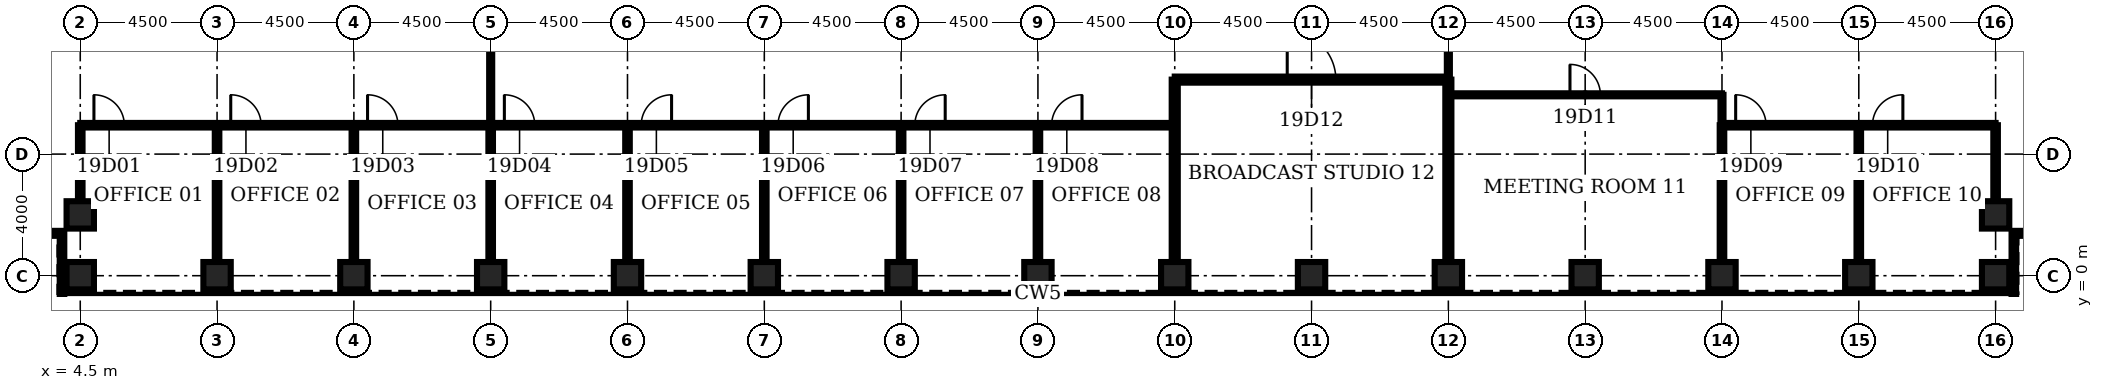
"""IFC4 building model, lengths in metres.
Left out: names, types, materials, properties, quantities, classifications, styles, units other than length and angle.
Written with IfcOpenShell. Run it as: python <this file> out.ifc"""

import sys

from ifc_helpers import new_model, si_unit, direction, frame, frame_2d, origin, origin_2d, place, context, subcontext, project, spatial, rectangle, hollow_rectangle, extrude, element, fill, save


model = new_model("IFC4")
c1 = context("Model", 3, precision=1e-05, world=origin(), true_north=direction((0.0, 1.0)))
c2 = subcontext(c1, "Body", "Model", "MODEL_VIEW")
j1 = project(units=[si_unit("LENGTHUNIT", "METRE"), si_unit("PLANEANGLEUNIT", "RADIAN")], contexts=[c1])
p1 = place(None, origin())
s1 = spatial("IfcSite", under=j1, at=p1, CompositionType="ELEMENT")
p2 = place(p1, origin())
s2 = spatial("IfcBuilding", under=s1, at=p2, CompositionType="ELEMENT")
p3 = place(p2, frame((0.0, 0.0, 90.5)))
s3 = spatial("IfcBuildingStorey", under=s2, at=p3, CompositionType="ELEMENT", Elevation=90.5)
for number, where, z_axis, x_axis in (
    (1, (4.5, 0.0, 0.0), (0.0, 0.0, 1.0), (0.0, 1.0, 0.0)),
    (2, (9.0, 0.0, 0.0), (0.0, 0.0, 1.0), (0.0, 1.0, 0.0)),
    (3, (13.5, 0.0, 0.0), (0.0, 0.0, 1.0), (0.0, 1.0, 0.0)),
    (4, (18.0, 0.0, 0.0), (0.0, 0.0, 1.0), (0.0, 1.0, 0.0)),
    (5, (22.5, 0.0, 0.0), (0.0, 0.0, 1.0), (0.0, 1.0, 0.0)),
    (6, (27.0, 0.0, 0.0), (0.0, 0.0, 1.0), (0.0, 1.0, 0.0)),
    (7, (31.5, 0.0, 0.0), (0.0, 0.0, 1.0), (0.0, 1.0, 0.0)),
    (8, (36.0, 0.0, 0.0), (0.0, 0.0, 1.0), (0.0, 1.0, 0.0)),
    (9, (40.5, 0.0, 0.0), (0.0, 0.0, 1.0), (0.0, 1.0, 0.0)),
    (10, (45.0, 0.0, 0.0), (0.0, 0.0, 1.0), (0.0, 1.0, 0.0)),
    (11, (49.5, 0.0, 0.0), (0.0, 0.0, 1.0), (0.0, 1.0, 0.0)),
    (12, (54.0, 0.0, 0.0), (0.0, 0.0, 1.0), (0.0, 1.0, 0.0)),
    (13, (58.5, 0.0, 0.0), (0.0, 0.0, 1.0), (0.0, 1.0, 0.0)),
    (14, (63.0, 0.0, 0.0), (0.0, 0.0, 1.0), (0.0, 1.0, 0.0)),
    (15, (67.5, 0.0, 0.0), (0.0, 0.0, 1.0), (0.0, 1.0, 0.0)),
    (16, (67.5, 2.0, 0.0), (0.0, 0.0, 1.0), (0.0, 1.0, 0.0)),
    (17, (4.5, 2.0, 0.0), (0.0, 0.0, 1.0), (0.0, 1.0, 0.0)),
):
    element("IfcColumn", number, at=place(p3, frame(where, z_axis=z_axis, x_axis=x_axis)), inside=s3, PredefinedType="COLUMN", context=c2, shape_type="SweptSolid", body=[
        extrude(hollow_rectangle(XDim=0.9, YDim=0.9, WallThickness=0.11, at=origin_2d()), origin(), (0.0, 0.0, 1.0), 4.5),
    ])
p4 = place(p3, frame((4.5, 4.95, 0.0), z_axis=(0.0, 0.0, 1.0), x_axis=(1.0, 0.0, 0.0)))
e18 = element("IfcWall", 18, at=p4, inside=s3, PredefinedType="PARTITIONING", context=c2, shape_type="SweptSolid", body=[
    extrude(rectangle(XDim=36.0, YDim=0.15, at=frame_2d((18.0, 0.0))), origin(), (0.0, 0.0, 1.0), 3.0),
])
p5 = place(p4, frame((0.45, 0.0, 0.0)))
e19 = element("IfcOpeningElement", 19, at=p5, cuts=e18, PredefinedType="OPENING", context=c2, shape_type="SweptSolid", body=[
    extrude(rectangle(XDim=1.0, YDim=2.1, at=frame_2d((0.5, 1.05))), frame((0.0, 0.085, 0.0), z_axis=(0.0, -1.0, 0.0), x_axis=(1.0, 0.0, 0.0)), (0.0, 0.0, 1.0), 0.17),
])
p6 = place(p4, frame((4.95, 0.0, 0.0)))
e20 = element("IfcOpeningElement", 20, at=p6, cuts=e18, PredefinedType="OPENING", context=c2, shape_type="SweptSolid", body=[
    extrude(rectangle(XDim=1.0, YDim=2.1, at=frame_2d((0.5, 1.05))), frame((0.0, 0.085, 0.0), z_axis=(0.0, -1.0, 0.0), x_axis=(1.0, 0.0, 0.0)), (0.0, 0.0, 1.0), 0.17),
])
p7 = place(p4, frame((9.45, 0.0, 0.0)))
e21 = element("IfcOpeningElement", 21, at=p7, cuts=e18, PredefinedType="OPENING", context=c2, shape_type="SweptSolid", body=[
    extrude(rectangle(XDim=1.0, YDim=2.1, at=frame_2d((0.5, 1.05))), frame((0.0, 0.085, 0.0), z_axis=(0.0, -1.0, 0.0), x_axis=(1.0, 0.0, 0.0)), (0.0, 0.0, 1.0), 0.17),
])
p8 = place(p4, frame((13.95, 0.0, 0.0)))
e22 = element("IfcOpeningElement", 22, at=p8, cuts=e18, PredefinedType="OPENING", context=c2, shape_type="SweptSolid", body=[
    extrude(rectangle(XDim=1.0, YDim=2.1, at=frame_2d((0.5, 1.05))), frame((0.0, 0.085, 0.0), z_axis=(0.0, -1.0, 0.0), x_axis=(1.0, 0.0, 0.0)), (0.0, 0.0, 1.0), 0.17),
])
p9 = place(p4, frame((18.45, 0.0, 0.0)))
e23 = element("IfcOpeningElement", 23, at=p9, cuts=e18, PredefinedType="OPENING", context=c2, shape_type="SweptSolid", body=[
    extrude(rectangle(XDim=1.0, YDim=2.1, at=frame_2d((0.5, 1.05))), frame((0.0, 0.085, 0.0), z_axis=(0.0, -1.0, 0.0), x_axis=(1.0, 0.0, 0.0)), (0.0, 0.0, 1.0), 0.17),
])
p10 = place(p4, frame((22.95, 0.0, 0.0)))
e24 = element("IfcOpeningElement", 24, at=p10, cuts=e18, PredefinedType="OPENING", context=c2, shape_type="SweptSolid", body=[
    extrude(rectangle(XDim=1.0, YDim=2.1, at=frame_2d((0.5, 1.05))), frame((0.0, 0.085, 0.0), z_axis=(0.0, -1.0, 0.0), x_axis=(1.0, 0.0, 0.0)), (0.0, 0.0, 1.0), 0.17),
])
p11 = place(p4, frame((27.45, 0.0, 0.0)))
e25 = element("IfcOpeningElement", 25, at=p11, cuts=e18, PredefinedType="OPENING", context=c2, shape_type="SweptSolid", body=[
    extrude(rectangle(XDim=1.0, YDim=2.1, at=frame_2d((0.5, 1.05))), frame((0.0, 0.085, 0.0), z_axis=(0.0, -1.0, 0.0), x_axis=(1.0, 0.0, 0.0)), (0.0, 0.0, 1.0), 0.17),
])
p12 = place(p4, frame((31.95, 0.0, 0.0)))
e26 = element("IfcOpeningElement", 26, at=p12, cuts=e18, PredefinedType="OPENING", context=c2, shape_type="SweptSolid", body=[
    extrude(rectangle(XDim=1.0, YDim=2.1, at=frame_2d((0.5, 1.05))), frame((0.0, 0.085, 0.0), z_axis=(0.0, -1.0, 0.0), x_axis=(1.0, 0.0, 0.0)), (0.0, 0.0, 1.0), 0.17),
])
p13 = place(p3, frame((58.5, 4.95, 0.0), z_axis=(0.0, 0.0, 1.0), x_axis=(1.0, 0.0, 0.0)))
e27 = element("IfcWall", 27, at=p13, inside=s3, PredefinedType="PARTITIONING", context=c2, shape_type="SweptSolid", body=[
    extrude(rectangle(XDim=9.0, YDim=0.15, at=frame_2d((4.5, 0.0))), origin(), (0.0, 0.0, 1.0), 3.0),
])
p14 = place(p13, frame((0.45, 0.0, 0.0)))
e28 = element("IfcOpeningElement", 28, at=p14, cuts=e27, PredefinedType="OPENING", context=c2, shape_type="SweptSolid", body=[
    extrude(rectangle(XDim=1.0, YDim=2.1, at=frame_2d((0.5, 1.05))), frame((0.0, 0.085, 0.0), z_axis=(0.0, -1.0, 0.0), x_axis=(1.0, 0.0, 0.0)), (0.0, 0.0, 1.0), 0.17),
])
p15 = place(p13, frame((4.95, 0.0, 0.0)))
e29 = element("IfcOpeningElement", 29, at=p15, cuts=e27, PredefinedType="OPENING", context=c2, shape_type="SweptSolid", body=[
    extrude(rectangle(XDim=1.0, YDim=2.1, at=frame_2d((0.5, 1.05))), frame((0.0, 0.085, 0.0), z_axis=(0.0, -1.0, 0.0), x_axis=(1.0, 0.0, 0.0)), (0.0, 0.0, 1.0), 0.17),
])
p16 = place(p3, frame((49.5, 5.95, 0.0), z_axis=(0.0, 0.0, 1.0), x_axis=(1.0, 0.0, 0.0)))
e30 = element("IfcWall", 30, at=p16, inside=s3, PredefinedType="PARTITIONING", context=c2, shape_type="SweptSolid", body=[
    extrude(rectangle(XDim=9.0, YDim=0.1, at=frame_2d((4.5, 0.0))), origin(), (0.0, 0.0, 1.0), 3.0),
])
p17 = place(p16, frame((4.0, 0.0, 0.0)))
e31 = element("IfcOpeningElement", 31, at=p17, cuts=e30, PredefinedType="OPENING", context=c2, shape_type="SweptSolid", body=[
    extrude(rectangle(XDim=1.0, YDim=2.1, at=frame_2d((0.5, 1.05))), frame((0.0, 0.06, 0.0), z_axis=(0.0, -1.0, 0.0), x_axis=(1.0, 0.0, 0.0)), (0.0, 0.0, 1.0), 0.12),
])
p18 = place(p3, frame((40.5, 6.45, 0.0), z_axis=(0.0, 0.0, 1.0), x_axis=(1.0, 0.0, 0.0)))
e32 = element("IfcWall", 32, at=p18, inside=s3, PredefinedType="PARTITIONING", context=c2, shape_type="SweptSolid", body=[
    extrude(rectangle(XDim=9.0, YDim=0.2, at=frame_2d((4.5, 0.0))), origin(), (0.0, 0.0, 1.0), 3.0),
])
p19 = place(p18, frame((3.7, 0.0, 0.0)))
e33 = element("IfcOpeningElement", 33, at=p19, cuts=e32, PredefinedType="OPENING", context=c2, shape_type="SweptSolid", body=[
    extrude(rectangle(XDim=1.6, YDim=2.1, at=frame_2d((0.8, 1.05))), frame((0.0, 0.11, 0.0), z_axis=(0.0, -1.0, 0.0), x_axis=(1.0, 0.0, 0.0)), (0.0, 0.0, 1.0), 0.22),
])
p20 = place(p3, frame((4.5, 2.45, 0.0), z_axis=(0.0, 0.0, 1.0), x_axis=(0.0, 1.0, 0.0)))
e34 = element("IfcWall", 34, at=p20, inside=s3, PredefinedType="PARTITIONING", context=c2, shape_type="SweptSolid", body=[
    extrude(rectangle(XDim=2.5, YDim=0.15, at=frame_2d((1.25, 0.0))), origin(), (0.0, 0.0, 1.0), 3.0),
])
for number, where, z_axis, x_axis in (
    (35, (9.0, 0.45, 0.0), (0.0, 0.0, 1.0), (0.0, 1.0, 0.0)),
    (36, (13.5, 0.45, 0.0), (0.0, 0.0, 1.0), (0.0, 1.0, 0.0)),
    (37, (18.0, 0.45, 0.0), (0.0, 0.0, 1.0), (0.0, 1.0, 0.0)),
):
    element("IfcWall", number, at=place(p3, frame(where, z_axis=z_axis, x_axis=x_axis)), inside=s3, PredefinedType="PARTITIONING", context=c2, shape_type="SweptSolid", body=[
        extrude(rectangle(XDim=4.5, YDim=0.15, at=frame_2d((2.25, 0.0))), origin(), (0.0, 0.0, 1.0), 3.0),
    ])
p21 = place(p3, frame((18.0, 4.95, 0.0), z_axis=(0.0, 0.0, 1.0), x_axis=(0.0, 1.0, 0.0)))
e38 = element("IfcWall", 38, at=p21, inside=s3, PredefinedType="PARTITIONING", context=c2, shape_type="SweptSolid", body=[
    extrude(rectangle(XDim=10.6, YDim=0.1, at=frame_2d((5.3, 0.0))), origin(), (0.0, 0.0, 1.0), 3.0),
])
p22 = place(p21, frame((4.5, 0.0, 0.0)))
e39 = element("IfcOpeningElement", 39, at=p22, cuts=e38, PredefinedType="OPENING", context=c2, shape_type="SweptSolid", body=[
    extrude(rectangle(XDim=1.6, YDim=2.1, at=frame_2d((0.8, 1.05))), frame((0.0, 0.06, 0.0), z_axis=(0.0, -1.0, 0.0), x_axis=(1.0, 0.0, 0.0)), (0.0, 0.0, 1.0), 0.12),
])
for number, where, z_axis, x_axis in (
    (40, (22.5, 0.45, 0.0), (0.0, 0.0, 1.0), (0.0, 1.0, 0.0)),
    (41, (27.0, 0.45, 0.0), (0.0, 0.0, 1.0), (0.0, 1.0, 0.0)),
    (42, (31.5, 0.45, 0.0), (0.0, 0.0, 1.0), (0.0, 1.0, 0.0)),
    (43, (36.0, 0.45, 0.0), (0.0, 0.0, 1.0), (0.0, 1.0, 0.0)),
):
    element("IfcWall", number, at=place(p3, frame(where, z_axis=z_axis, x_axis=x_axis)), inside=s3, PredefinedType="PARTITIONING", context=c2, shape_type="SweptSolid", body=[
        extrude(rectangle(XDim=4.5, YDim=0.15, at=frame_2d((2.25, 0.0))), origin(), (0.0, 0.0, 1.0), 3.0),
    ])
for number, where, z_axis, x_axis in (
    (44, (40.5, 0.45, 0.0), (0.0, 0.0, 1.0), (0.0, 1.0, 0.0)),
    (45, (49.5, 0.45, 0.0), (0.0, 0.0, 1.0), (0.0, 1.0, 0.0)),
):
    element("IfcWall", number, at=place(p3, frame(where, z_axis=z_axis, x_axis=x_axis)), inside=s3, PredefinedType="PARTITIONING", context=c2, shape_type="SweptSolid", body=[
        extrude(rectangle(XDim=6.0, YDim=0.2, at=frame_2d((3.0, 0.0))), origin(), (0.0, 0.0, 1.0), 3.0),
    ])
p23 = place(p3, frame((49.5, 6.45, 0.0), z_axis=(0.0, 0.0, 1.0), x_axis=(0.0, 1.0, 0.0)))
e46 = element("IfcWall", 46, at=p23, inside=s3, PredefinedType="PARTITIONING", context=c2, shape_type="SweptSolid", body=[
    extrude(rectangle(XDim=9.1, YDim=0.1, at=frame_2d((4.55, 0.0))), origin(), (0.0, 0.0, 1.0), 3.0),
])
p24 = place(p23, frame((3.75, 0.0, 0.0)))
e47 = element("IfcOpeningElement", 47, at=p24, cuts=e46, PredefinedType="OPENING", context=c2, shape_type="SweptSolid", body=[
    extrude(rectangle(XDim=1.6, YDim=2.1, at=frame_2d((0.8, 1.05))), frame((0.0, 0.06, 0.0), z_axis=(0.0, -1.0, 0.0), x_axis=(1.0, 0.0, 0.0)), (0.0, 0.0, 1.0), 0.12),
])
p25 = place(p3, frame((58.5, 0.45, 0.0), z_axis=(0.0, 0.0, 1.0), x_axis=(0.0, 1.0, 0.0)))
e48 = element("IfcWall", 48, at=p25, inside=s3, PredefinedType="PARTITIONING", context=c2, shape_type="SweptSolid", body=[
    extrude(rectangle(XDim=4.5, YDim=0.15, at=frame_2d((2.25, 0.0))), origin(), (0.0, 0.0, 1.0), 3.0),
])
p26 = place(p3, frame((58.5, 4.95, 0.0), z_axis=(0.0, 0.0, 1.0), x_axis=(0.0, 1.0, 0.0)))
e49 = element("IfcWall", 49, at=p26, inside=s3, PredefinedType="PARTITIONING", context=c2, shape_type="SweptSolid", body=[
    extrude(rectangle(XDim=1.0, YDim=0.1, at=frame_2d((0.5, 0.0))), origin(), (0.0, 0.0, 1.0), 3.0),
])
p27 = place(p3, frame((63.0, 0.45, 0.0), z_axis=(0.0, 0.0, 1.0), x_axis=(0.0, 1.0, 0.0)))
e50 = element("IfcWall", 50, at=p27, inside=s3, PredefinedType="PARTITIONING", context=c2, shape_type="SweptSolid", body=[
    extrude(rectangle(XDim=4.5, YDim=0.15, at=frame_2d((2.25, 0.0))), origin(), (0.0, 0.0, 1.0), 3.0),
])
p28 = place(p3, frame((67.5, 2.45, 0.0), z_axis=(0.0, 0.0, 1.0), x_axis=(0.0, 1.0, 0.0)))
e51 = element("IfcWall", 51, at=p28, inside=s3, PredefinedType="PARTITIONING", context=c2, shape_type="SweptSolid", body=[
    extrude(rectangle(XDim=2.5, YDim=0.15, at=frame_2d((1.25, 0.0))), origin(), (0.0, 0.0, 1.0), 3.0),
])
p29 = place(p3, frame((68.1, -0.6, 0.0), z_axis=(0.0, 0.0, 1.0), x_axis=(0.0, 1.0, 0.0)))
e52 = element("IfcWall", 52, at=p29, inside=s3, PredefinedType="ELEMENTEDWALL", context=c2, shape_type="SweptSolid", body=[
    extrude(rectangle(XDim=2.0, YDim=0.15, at=frame_2d((1.0, 0.0))), origin(), (0.0, 0.0, 1.0), 4.25),
])
for number, where, z_axis, x_axis in (
    (53, (68.1, 1.4, 0.0), (0.0, 0.0, 1.0), (1.0, 0.0, 0.0)),
    (54, (1.65, 1.4, 0.0), (0.0, 0.0, 1.0), (1.0, 0.0, 0.0)),
):
    element("IfcWall", number, at=place(p3, frame(where, z_axis=z_axis, x_axis=x_axis)), inside=s3, PredefinedType="ELEMENTEDWALL", context=c2, shape_type="SweptSolid", body=[
        extrude(rectangle(XDim=2.25, YDim=0.15, at=frame_2d((1.125, 0.0))), origin(), (0.0, 0.0, 1.0), 4.25),
    ])
p30 = place(p3, frame((3.9, 1.4, 0.0), z_axis=(0.0, 0.0, 1.0), x_axis=(0.0, -1.0, 0.0)))
e55 = element("IfcWall", 55, at=p30, inside=s3, PredefinedType="ELEMENTEDWALL", context=c2, shape_type="SweptSolid", body=[
    extrude(rectangle(XDim=2.0, YDim=0.15, at=frame_2d((1.0, 0.0))), origin(), (0.0, 0.0, 1.0), 4.25),
])
p31 = place(p5, origin())
e56 = element("IfcDoor", 56, at=p31, inside=s3, OperationType="SINGLE_SWING_LEFT", PredefinedType="DOOR", context=c2, shape_type="SweptSolid", body=[
    extrude(rectangle(XDim=1.0, YDim=2.1, at=frame_2d((0.5, 1.05))), frame((0.0, 0.025, 0.0), z_axis=(0.0, -1.0, 0.0), x_axis=(1.0, 0.0, 0.0)), (0.0, 0.0, 1.0), 0.05),
])
fill(e19, e56)
p32 = place(p6, origin())
e57 = element("IfcDoor", 57, at=p32, inside=s3, OperationType="SINGLE_SWING_LEFT", PredefinedType="DOOR", context=c2, shape_type="SweptSolid", body=[
    extrude(rectangle(XDim=1.0, YDim=2.1, at=frame_2d((0.5, 1.05))), frame((0.0, 0.025, 0.0), z_axis=(0.0, -1.0, 0.0), x_axis=(1.0, 0.0, 0.0)), (0.0, 0.0, 1.0), 0.05),
])
fill(e20, e57)
p33 = place(p7, origin())
e58 = element("IfcDoor", 58, at=p33, inside=s3, OperationType="SINGLE_SWING_LEFT", PredefinedType="DOOR", context=c2, shape_type="SweptSolid", body=[
    extrude(rectangle(XDim=1.0, YDim=2.1, at=frame_2d((0.5, 1.05))), frame((0.0, 0.025, 0.0), z_axis=(0.0, -1.0, 0.0), x_axis=(1.0, 0.0, 0.0)), (0.0, 0.0, 1.0), 0.05),
])
fill(e21, e58)
p34 = place(p8, origin())
e59 = element("IfcDoor", 59, at=p34, inside=s3, OperationType="SINGLE_SWING_LEFT", PredefinedType="DOOR", context=c2, shape_type="SweptSolid", body=[
    extrude(rectangle(XDim=1.0, YDim=2.1, at=frame_2d((0.5, 1.05))), frame((0.0, 0.025, 0.0), z_axis=(0.0, -1.0, 0.0), x_axis=(1.0, 0.0, 0.0)), (0.0, 0.0, 1.0), 0.05),
])
fill(e22, e59)
p35 = place(p9, origin())
e60 = element("IfcDoor", 60, at=p35, inside=s3, OperationType="SINGLE_SWING_RIGHT", PredefinedType="DOOR", context=c2, shape_type="SweptSolid", body=[
    extrude(rectangle(XDim=1.0, YDim=2.1, at=frame_2d((0.5, 1.05))), frame((0.0, 0.025, 0.0), z_axis=(0.0, -1.0, 0.0), x_axis=(1.0, 0.0, 0.0)), (0.0, 0.0, 1.0), 0.05),
])
fill(e23, e60)
p36 = place(p10, origin())
e61 = element("IfcDoor", 61, at=p36, inside=s3, OperationType="SINGLE_SWING_RIGHT", PredefinedType="DOOR", context=c2, shape_type="SweptSolid", body=[
    extrude(rectangle(XDim=1.0, YDim=2.1, at=frame_2d((0.5, 1.05))), frame((0.0, 0.025, 0.0), z_axis=(0.0, -1.0, 0.0), x_axis=(1.0, 0.0, 0.0)), (0.0, 0.0, 1.0), 0.05),
])
fill(e24, e61)
p37 = place(p11, origin())
e62 = element("IfcDoor", 62, at=p37, inside=s3, OperationType="SINGLE_SWING_RIGHT", PredefinedType="DOOR", context=c2, shape_type="SweptSolid", body=[
    extrude(rectangle(XDim=1.0, YDim=2.1, at=frame_2d((0.5, 1.05))), frame((0.0, 0.025, 0.0), z_axis=(0.0, -1.0, 0.0), x_axis=(1.0, 0.0, 0.0)), (0.0, 0.0, 1.0), 0.05),
])
fill(e25, e62)
p38 = place(p12, origin())
e63 = element("IfcDoor", 63, at=p38, inside=s3, OperationType="SINGLE_SWING_RIGHT", PredefinedType="DOOR", context=c2, shape_type="SweptSolid", body=[
    extrude(rectangle(XDim=1.0, YDim=2.1, at=frame_2d((0.5, 1.05))), frame((0.0, 0.025, 0.0), z_axis=(0.0, -1.0, 0.0), x_axis=(1.0, 0.0, 0.0)), (0.0, 0.0, 1.0), 0.05),
])
fill(e26, e63)
p39 = place(p14, origin())
e64 = element("IfcDoor", 64, at=p39, inside=s3, OperationType="SINGLE_SWING_LEFT", PredefinedType="DOOR", context=c2, shape_type="SweptSolid", body=[
    extrude(rectangle(XDim=1.0, YDim=2.1, at=frame_2d((0.5, 1.05))), frame((0.0, 0.025, 0.0), z_axis=(0.0, -1.0, 0.0), x_axis=(1.0, 0.0, 0.0)), (0.0, 0.0, 1.0), 0.05),
])
fill(e28, e64)
p40 = place(p15, origin())
e65 = element("IfcDoor", 65, at=p40, inside=s3, OperationType="SINGLE_SWING_RIGHT", PredefinedType="DOOR", context=c2, shape_type="SweptSolid", body=[
    extrude(rectangle(XDim=1.0, YDim=2.1, at=frame_2d((0.5, 1.05))), frame((0.0, 0.025, 0.0), z_axis=(0.0, -1.0, 0.0), x_axis=(1.0, 0.0, 0.0)), (0.0, 0.0, 1.0), 0.05),
])
fill(e29, e65)
p41 = place(p17, origin())
e66 = element("IfcDoor", 66, at=p41, inside=s3, OperationType="SINGLE_SWING_LEFT", PredefinedType="DOOR", context=c2, shape_type="SweptSolid", body=[
    extrude(rectangle(XDim=1.0, YDim=2.1, at=frame_2d((0.5, 1.05))), frame((0.0, 0.025, 0.0), z_axis=(0.0, -1.0, 0.0), x_axis=(1.0, 0.0, 0.0)), (0.0, 0.0, 1.0), 0.05),
])
fill(e31, e66)
p42 = place(p19, origin())
e67 = element("IfcDoor", 67, at=p42, inside=s3, OperationType="SINGLE_SWING_LEFT", PredefinedType="DOOR", context=c2, shape_type="SweptSolid", body=[
    extrude(rectangle(XDim=1.6, YDim=2.1, at=frame_2d((0.8, 1.05))), frame((0.0, 0.025, 0.0), z_axis=(0.0, -1.0, 0.0), x_axis=(1.0, 0.0, 0.0)), (0.0, 0.0, 1.0), 0.05),
])
fill(e33, e67)
save(model, sys.argv[1])
